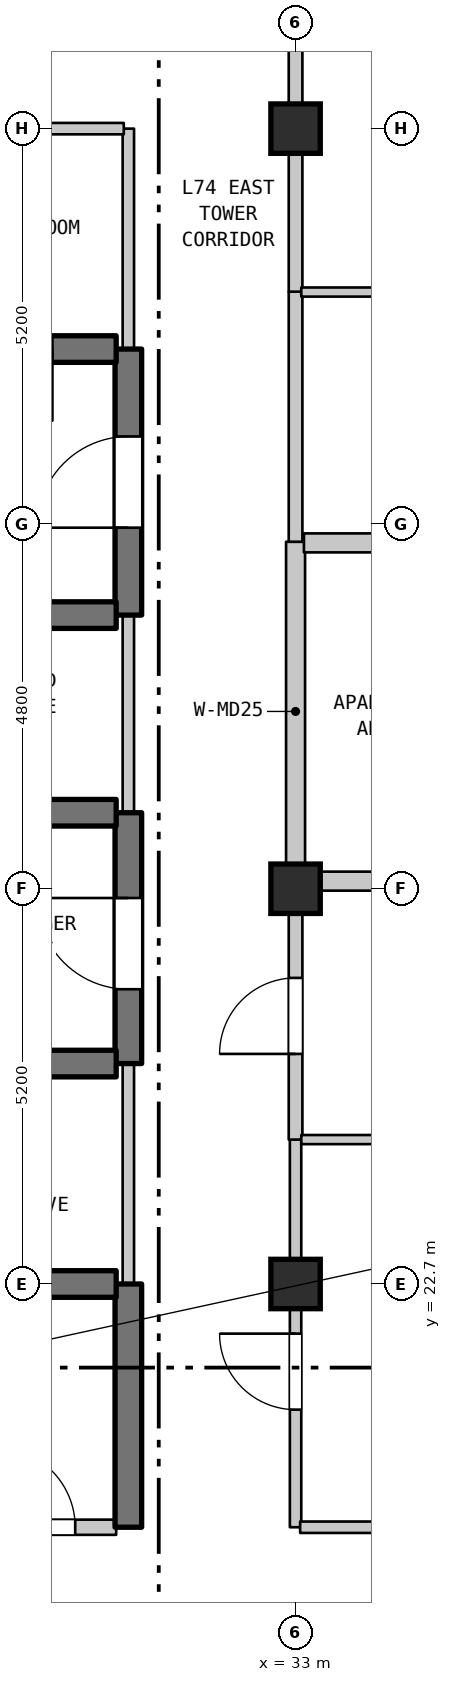
"""IFC4 building model, lengths in metres.
Left out: names, types, materials, properties, quantities, classifications, styles, units other than length and angle.
Written with IfcOpenShell. Run it as: python <this file> out.ifc"""

import sys

from ifc_helpers import new_model, si_unit, direction, frame, frame_2d, origin, origin_2d, place, context, subcontext, project, spatial, rectangle, extrude, element, fill, save


model = new_model("IFC4")
c1 = context("Model", 3, precision=1e-05, world=origin(), true_north=direction((0.0, 1.0)))
c2 = subcontext(c1, "Body", "Model", "MODEL_VIEW")
j1 = project(units=[si_unit("LENGTHUNIT", "METRE"), si_unit("PLANEANGLEUNIT", "RADIAN")], contexts=[c1])
p1 = place(None, origin())
s1 = spatial("IfcSite", under=j1, at=p1, CompositionType="ELEMENT")
p2 = place(p1, origin())
s2 = spatial("IfcBuilding", under=s1, at=p2, CompositionType="ELEMENT")
p3 = place(p2, frame((0.0, 0.0, 295.4)))
s3 = spatial("IfcBuildingStorey", under=s2, at=p3, CompositionType="ELEMENT", Elevation=295.4)
for number, where, z_axis, x_axis in (
    (1, (33.0, 22.7, 0.0), (0.0, 0.0, 1.0), (1.0, 0.0, 0.0)),
    (2, (33.0, 27.9, 0.0), (0.0, 0.0, 1.0), (1.0, 0.0, 0.0)),
    (3, (33.0, 37.9, 0.0), (0.0, 0.0, 1.0), (1.0, 0.0, 0.0)),
):
    element("IfcColumn", number, at=place(p3, frame(where, z_axis=z_axis, x_axis=x_axis)), inside=s3, PredefinedType="COLUMN", context=c2, shape_type="SweptSolid", body=[
        extrude(rectangle(XDim=0.65, YDim=0.65, at=origin_2d()), origin(), (0.0, 0.0, 1.0), 3.7),
    ])
p4 = place(p3, frame((30.8, 19.5, 0.0), z_axis=(0.0, 0.0, 1.0), x_axis=(0.0, 1.0, 0.0)))
e4 = element("IfcWall", 4, at=p4, inside=s3, PredefinedType="SHEAR", context=c2, shape_type="SweptSolid", body=[
    extrude(rectangle(XDim=3.2, YDim=0.35, at=frame_2d((1.6, 0.0))), origin(), (0.0, 0.0, 1.0), 3.38),
])
p5 = place(p3, frame((30.8, 22.7, 0.0), z_axis=(0.0, 0.0, 1.0), x_axis=(0.0, 1.0, 0.0)))
e5 = element("IfcWall", 5, at=p5, inside=s3, PredefinedType="STANDARD", context=c2, shape_type="SweptSolid", body=[
    extrude(rectangle(XDim=2.9, YDim=0.15, at=frame_2d((1.45, 0.0))), origin(), (0.0, 0.0, 1.0), 3.38),
])
p6 = place(p3, frame((30.8, 25.6, 0.0), z_axis=(0.0, 0.0, 1.0), x_axis=(0.0, 1.0, 0.0)))
e6 = element("IfcWall", 6, at=p6, inside=s3, PredefinedType="SHEAR", context=c2, shape_type="SweptSolid", body=[
    extrude(rectangle(XDim=3.3, YDim=0.35, at=frame_2d((1.65, 0.0))), origin(), (0.0, 0.0, 1.0), 3.38),
])
p7 = place(p6, frame((0.978, 0.0, 0.0)))
e7 = element("IfcOpeningElement", 7, at=p7, cuts=e6, PredefinedType="OPENING", context=c2, shape_type="SweptSolid", body=[
    extrude(rectangle(XDim=1.2, YDim=2.2, at=frame_2d((0.6, 1.1))), frame((0.0, 0.185, 0.0), z_axis=(0.0, -1.0, 0.0), x_axis=(1.0, 0.0, 0.0)), (0.0, 0.0, 1.0), 0.37),
])
p8 = place(p3, frame((30.8, 28.9, 0.0), z_axis=(0.0, 0.0, 1.0), x_axis=(0.0, 1.0, 0.0)))
e8 = element("IfcWall", 8, at=p8, inside=s3, PredefinedType="STANDARD", context=c2, shape_type="SweptSolid", body=[
    extrude(rectangle(XDim=2.6, YDim=0.15, at=frame_2d((1.3, 0.0))), origin(), (0.0, 0.0, 1.0), 3.38),
])
p9 = place(p3, frame((30.8, 31.5, 0.0), z_axis=(0.0, 0.0, 1.0), x_axis=(0.0, 1.0, 0.0)))
e9 = element("IfcWall", 9, at=p9, inside=s3, PredefinedType="SHEAR", context=c2, shape_type="SweptSolid", body=[
    extrude(rectangle(XDim=3.5, YDim=0.35, at=frame_2d((1.75, 0.0))), origin(), (0.0, 0.0, 1.0), 3.38),
])
p10 = place(p9, frame((1.15, 0.0, 0.0)))
e10 = element("IfcOpeningElement", 10, at=p10, cuts=e9, PredefinedType="OPENING", context=c2, shape_type="SweptSolid", body=[
    extrude(rectangle(XDim=1.2, YDim=2.2, at=frame_2d((0.6, 1.1))), frame((0.0, 0.185, 0.0), z_axis=(0.0, -1.0, 0.0), x_axis=(1.0, 0.0, 0.0)), (0.0, 0.0, 1.0), 0.37),
])
p11 = place(p3, frame((30.8, 35.0, 0.0), z_axis=(0.0, 0.0, 1.0), x_axis=(0.0, 1.0, 0.0)))
e11 = element("IfcWall", 11, at=p11, inside=s3, PredefinedType="STANDARD", context=c2, shape_type="SweptSolid", body=[
    extrude(rectangle(XDim=2.9, YDim=0.15, at=frame_2d((1.45, 0.0))), origin(), (0.0, 0.0, 1.0), 3.38),
])
p12 = place(p3, frame((33.0, 19.5, 0.0), z_axis=(0.0, 0.0, 1.0), x_axis=(0.0, 1.0, 0.0)))
e12 = element("IfcWall", 12, at=p12, inside=s3, PredefinedType="STANDARD", context=c2, shape_type="SweptSolid", body=[
    extrude(rectangle(XDim=5.1, YDim=0.15, at=frame_2d((2.55, 0.0))), origin(), (0.0, 0.0, 1.0), 3.09),
])
p13 = place(p12, frame((1.547, 0.0, 0.0)))
e13 = element("IfcOpeningElement", 13, at=p13, cuts=e12, PredefinedType="OPENING", context=c2, shape_type="SweptSolid", body=[
    extrude(rectangle(XDim=1.0, YDim=2.15, at=frame_2d((0.5, 1.075))), frame((0.0, 0.085, 0.0), z_axis=(0.0, -1.0, 0.0), x_axis=(1.0, 0.0, 0.0)), (0.0, 0.0, 1.0), 0.17),
])
p14 = place(p3, frame((33.0, 24.6, 0.0), z_axis=(0.0, 0.0, 1.0), x_axis=(0.0, 1.0, 0.0)))
e14 = element("IfcWall", 14, at=p14, inside=s3, PredefinedType="STANDARD", context=c2, shape_type="SweptSolid", body=[
    extrude(rectangle(XDim=3.4, YDim=0.18, at=frame_2d((1.7, 0.0))), origin(), (0.0, 0.0, 1.0), 3.09),
])
p15 = place(p14, frame((1.127, 0.0, 0.0)))
e15 = element("IfcOpeningElement", 15, at=p15, cuts=e14, PredefinedType="OPENING", context=c2, shape_type="SweptSolid", body=[
    extrude(rectangle(XDim=1.0, YDim=2.15, at=frame_2d((0.5, 1.075))), frame((0.0, 0.1, 0.0), z_axis=(0.0, -1.0, 0.0), x_axis=(1.0, 0.0, 0.0)), (0.0, 0.0, 1.0), 0.2),
])
p16 = place(p3, frame((33.0, 28.0, 0.0), z_axis=(0.0, 0.0, 1.0), x_axis=(0.0, 1.0, 0.0)))
e16 = element("IfcWall", 16, at=p16, inside=s3, PredefinedType="STANDARD", context=c2, shape_type="SweptSolid", body=[
    extrude(rectangle(XDim=4.465, YDim=0.25, at=frame_2d((2.232, 0.0))), origin(), (0.0, 0.0, 1.0), 2.88),
])
p17 = place(p3, frame((33.0, 32.465, 0.0), z_axis=(0.0, 0.0, 1.0), x_axis=(0.0, 1.0, 0.0)))
e17 = element("IfcWall", 17, at=p17, inside=s3, PredefinedType="STANDARD", context=c2, shape_type="SweptSolid", body=[
    extrude(rectangle(XDim=3.29, YDim=0.18, at=frame_2d((1.645, 0.0))), origin(), (0.0, 0.0, 1.0), 2.88),
])
p18 = place(p3, frame((33.0, 35.755, 0.0), z_axis=(0.0, 0.0, 1.0), x_axis=(0.0, 1.0, 0.0)))
e18 = element("IfcWall", 18, at=p18, inside=s3, PredefinedType="STANDARD", context=c2, shape_type="SweptSolid", body=[
    extrude(rectangle(XDim=2.145, YDim=0.18, at=frame_2d((1.073, 0.0))), origin(), (0.0, 0.0, 1.0), 2.88),
])
p19 = place(p3, frame((28.585, 19.5, 0.0), z_axis=(0.0, 0.0, 1.0), x_axis=(1.0, 0.0, 0.0)))
e19 = element("IfcWall", 19, at=p19, inside=s3, PredefinedType="STANDARD", context=c2, shape_type="SweptSolid", body=[
    extrude(rectangle(XDim=2.055, YDim=0.2, at=frame_2d((1.027, 0.0))), origin(), (0.0, 0.0, 1.0), 3.38),
])
p20 = place(p19, frame((0.466, 0.0, 0.0)))
e20 = element("IfcOpeningElement", 20, at=p20, cuts=e19, PredefinedType="OPENING", context=c2, shape_type="SweptSolid", body=[
    extrude(rectangle(XDim=1.05, YDim=2.15, at=frame_2d((0.525, 1.075))), frame((0.0, 0.11, 0.0), z_axis=(0.0, -1.0, 0.0), x_axis=(1.0, 0.0, 0.0)), (0.0, 0.0, 1.0), 0.22),
])
p21 = place(p3, frame((33.06, 19.5, 0.0), z_axis=(0.0, 0.0, 1.0), x_axis=(1.0, 0.0, 0.0)))
e21 = element("IfcWall", 21, at=p21, inside=s3, PredefinedType="STANDARD", context=c2, shape_type="SweptSolid", body=[
    extrude(rectangle(XDim=8.323, YDim=0.15, at=frame_2d((4.162, 0.0))), origin(), (0.0, 0.0, 1.0), 3.38),
])
p22 = place(p21, frame((3.583, 0.0, 0.0)))
e22 = element("IfcOpeningElement", 22, at=p22, cuts=e21, PredefinedType="OPENING", context=c2, shape_type="SweptSolid", body=[
    extrude(rectangle(XDim=1.0, YDim=2.15, at=frame_2d((0.5, 1.075))), frame((0.0, 0.085, 0.0), z_axis=(0.0, -1.0, 0.0), x_axis=(1.0, 0.0, 0.0)), (0.0, 0.0, 1.0), 0.17),
])
p23 = place(p3, frame((28.585, 22.7, 0.0), z_axis=(0.0, 0.0, 1.0), x_axis=(1.0, 0.0, 0.0)))
e23 = element("IfcWall", 23, at=p23, inside=s3, PredefinedType="SHEAR", context=c2, shape_type="SweptSolid", body=[
    extrude(rectangle(XDim=2.055, YDim=0.35, at=frame_2d((1.027, 0.0))), origin(), (0.0, 0.0, 1.0), 3.38),
])
p24 = place(p3, frame((33.075, 24.6, 0.0), z_axis=(0.0, 0.0, 1.0), x_axis=(1.0, 0.0, 0.0)))
e24 = element("IfcWall", 24, at=p24, inside=s3, PredefinedType="PARTITIONING", context=c2, shape_type="SweptSolid", body=[
    extrude(rectangle(XDim=11.448, YDim=0.12, at=frame_2d((5.724, 0.0))), origin(), (0.0, 0.0, 1.0), 3.38),
])
p25 = place(p3, frame((27.46, 25.6, 0.0), z_axis=(0.0, 0.0, 1.0), x_axis=(1.0, 0.0, 0.0)))
e25 = element("IfcWall", 25, at=p25, inside=s3, PredefinedType="SHEAR", context=c2, shape_type="SweptSolid", body=[
    extrude(rectangle(XDim=3.18, YDim=0.35, at=frame_2d((1.59, 0.0))), origin(), (0.0, 0.0, 1.0), 3.38),
])
p26 = place(p25, frame((1.115, 0.0, 0.0)))
e26 = element("IfcOpeningElement", 26, at=p26, cuts=e25, PredefinedType="OPENING", context=c2, shape_type="SweptSolid", body=[
    extrude(rectangle(XDim=0.95, YDim=2.15, at=frame_2d((0.475, 1.075))), frame((0.0, 0.185, 0.0), z_axis=(0.0, -1.0, 0.0), x_axis=(1.0, 0.0, 0.0)), (0.0, 0.0, 1.0), 0.37),
])
p27 = place(p3, frame((33.11, 28.0, 0.0), z_axis=(0.0, 0.0, 1.0), x_axis=(1.0, 0.0, 0.0)))
e27 = element("IfcWall", 27, at=p27, inside=s3, PredefinedType="STANDARD", context=c2, shape_type="SweptSolid", body=[
    extrude(rectangle(XDim=4.36, YDim=0.25, at=frame_2d((2.18, 0.0))), origin(), (0.0, 0.0, 1.0), 2.88),
])
p28 = place(p3, frame((27.46, 28.9, 0.0), z_axis=(0.0, 0.0, 1.0), x_axis=(1.0, 0.0, 0.0)))
e28 = element("IfcWall", 28, at=p28, inside=s3, PredefinedType="SHEAR", context=c2, shape_type="SweptSolid", body=[
    extrude(rectangle(XDim=3.18, YDim=0.35, at=frame_2d((1.59, 0.0))), origin(), (0.0, 0.0, 1.0), 3.38),
])
p29 = place(p28, frame((1.115, 0.0, 0.0)))
e29 = element("IfcOpeningElement", 29, at=p29, cuts=e28, PredefinedType="OPENING", context=c2, shape_type="SweptSolid", body=[
    extrude(rectangle(XDim=0.95, YDim=2.15, at=frame_2d((0.475, 1.075))), frame((0.0, 0.185, 0.0), z_axis=(0.0, -1.0, 0.0), x_axis=(1.0, 0.0, 0.0)), (0.0, 0.0, 1.0), 0.37),
])
p30 = place(p3, frame((27.46, 31.5, 0.0), z_axis=(0.0, 0.0, 1.0), x_axis=(1.0, 0.0, 0.0)))
e30 = element("IfcWall", 30, at=p30, inside=s3, PredefinedType="SHEAR", context=c2, shape_type="SweptSolid", body=[
    extrude(rectangle(XDim=3.18, YDim=0.35, at=frame_2d((1.59, 0.0))), origin(), (0.0, 0.0, 1.0), 3.38),
])
p31 = place(p3, frame((33.11, 32.45, 0.0), z_axis=(0.0, 0.0, 1.0), x_axis=(1.0, 0.0, 0.0)))
e31 = element("IfcWall", 31, at=p31, inside=s3, PredefinedType="STANDARD", context=c2, shape_type="SweptSolid", body=[
    extrude(rectangle(XDim=4.36, YDim=0.25, at=frame_2d((2.18, 0.0))), origin(), (0.0, 0.0, 1.0), 3.38),
])
p32 = place(p3, frame((28.045, 35.0, 0.0), z_axis=(0.0, 0.0, 1.0), x_axis=(1.0, 0.0, 0.0)))
e32 = element("IfcWall", 32, at=p32, inside=s3, PredefinedType="SHEAR", context=c2, shape_type="SweptSolid", body=[
    extrude(rectangle(XDim=2.595, YDim=0.35, at=frame_2d((1.297, 0.0))), origin(), (0.0, 0.0, 1.0), 3.38),
])
p33 = place(p32, frame((0.806, 0.0, 0.0)))
e33 = element("IfcOpeningElement", 33, at=p33, cuts=e32, PredefinedType="OPENING", context=c2, shape_type="SweptSolid", body=[
    extrude(rectangle(XDim=0.95, YDim=2.15, at=frame_2d((0.475, 1.075))), frame((0.0, 0.185, 0.0), z_axis=(0.0, -1.0, 0.0), x_axis=(1.0, 0.0, 0.0)), (0.0, 0.0, 1.0), 0.37),
])
p34 = place(p3, frame((33.075, 35.75, 0.0), z_axis=(0.0, 0.0, 1.0), x_axis=(1.0, 0.0, 0.0)))
e34 = element("IfcWall", 34, at=p34, inside=s3, PredefinedType="PARTITIONING", context=c2, shape_type="SweptSolid", body=[
    extrude(rectangle(XDim=4.46, YDim=0.12, at=frame_2d((2.23, 0.0))), origin(), (0.0, 0.0, 1.0), 3.38),
])
p35 = place(p3, frame((28.045, 37.9, 0.0), z_axis=(0.0, 0.0, 1.0), x_axis=(1.0, 0.0, 0.0)))
e35 = element("IfcWall", 35, at=p35, inside=s3, PredefinedType="STANDARD", context=c2, shape_type="SweptSolid", body=[
    extrude(rectangle(XDim=2.695, YDim=0.15, at=frame_2d((1.348, 0.0))), origin(), (0.0, 0.0, 1.0), 2.88),
])
p36 = place(p3, frame((33.0, 37.9, 0.0), z_axis=(0.0, 0.0, 1.0), x_axis=(0.0, 1.0, 0.0)))
e36 = element("IfcWall", 36, at=p36, inside=s3, PredefinedType="STANDARD", context=c2, shape_type="SweptSolid", body=[
    extrude(rectangle(XDim=1.85, YDim=0.18, at=frame_2d((0.925, 0.0))), origin(), (0.0, 0.0, 1.0), 2.78),
])
p37 = place(p7, origin())
e37 = element("IfcDoor", 37, at=p37, inside=s3, OperationType="SINGLE_SWING_RIGHT", PredefinedType="DOOR", context=c2, shape_type="SweptSolid", body=[
    extrude(rectangle(XDim=1.2, YDim=2.2, at=frame_2d((0.6, 1.1))), frame((0.0, 0.025, 0.0), z_axis=(0.0, -1.0, 0.0), x_axis=(1.0, 0.0, 0.0)), (0.0, 0.0, 1.0), 0.05),
])
fill(e7, e37)
p38 = place(p10, origin())
e38 = element("IfcDoor", 38, at=p38, inside=s3, OperationType="SINGLE_SWING_LEFT", PredefinedType="DOOR", context=c2, shape_type="SweptSolid", body=[
    extrude(rectangle(XDim=1.2, YDim=2.2, at=frame_2d((0.6, 1.1))), frame((0.0, 0.025, 0.0), z_axis=(0.0, -1.0, 0.0), x_axis=(1.0, 0.0, 0.0)), (0.0, 0.0, 1.0), 0.05),
])
fill(e10, e38)
p39 = place(p13, origin())
e39 = element("IfcDoor", 39, at=p39, inside=s3, OperationType="SINGLE_SWING_RIGHT", PredefinedType="DOOR", context=c2, shape_type="SweptSolid", body=[
    extrude(rectangle(XDim=1.0, YDim=2.15, at=frame_2d((0.5, 1.075))), frame((0.0, 0.025, 0.0), z_axis=(0.0, -1.0, 0.0), x_axis=(1.0, 0.0, 0.0)), (0.0, 0.0, 1.0), 0.05),
])
fill(e13, e39)
p40 = place(p15, origin())
e40 = element("IfcDoor", 40, at=p40, inside=s3, OperationType="SINGLE_SWING_LEFT", PredefinedType="DOOR", context=c2, shape_type="SweptSolid", body=[
    extrude(rectangle(XDim=1.0, YDim=2.15, at=frame_2d((0.5, 1.075))), frame((0.0, 0.025, 0.0), z_axis=(0.0, -1.0, 0.0), x_axis=(1.0, 0.0, 0.0)), (0.0, 0.0, 1.0), 0.05),
])
fill(e15, e40)
p41 = place(p20, origin())
e41 = element("IfcDoor", 41, at=p41, inside=s3, OperationType="SINGLE_SWING_LEFT", PredefinedType="DOOR", context=c2, shape_type="SweptSolid", body=[
    extrude(rectangle(XDim=1.05, YDim=2.15, at=frame_2d((0.525, 1.075))), frame((0.0, 0.025, 0.0), z_axis=(0.0, -1.0, 0.0), x_axis=(1.0, 0.0, 0.0)), (0.0, 0.0, 1.0), 0.05),
])
fill(e20, e41)
p42 = place(p33, frame((0.95, 0.0, 0.0), z_axis=(0.0, 0.0, 1.0), x_axis=(-1.0, 0.0, 0.0)))
e42 = element("IfcDoor", 42, at=p42, inside=s3, OperationType="SINGLE_SWING_RIGHT", PredefinedType="DOOR", context=c2, shape_type="SweptSolid", body=[
    extrude(rectangle(XDim=0.95, YDim=2.15, at=frame_2d((0.475, 1.075))), frame((0.0, 0.025, 0.0), z_axis=(0.0, -1.0, 0.0), x_axis=(1.0, 0.0, 0.0)), (0.0, 0.0, 1.0), 0.05),
])
fill(e33, e42)
save(model, sys.argv[1])
